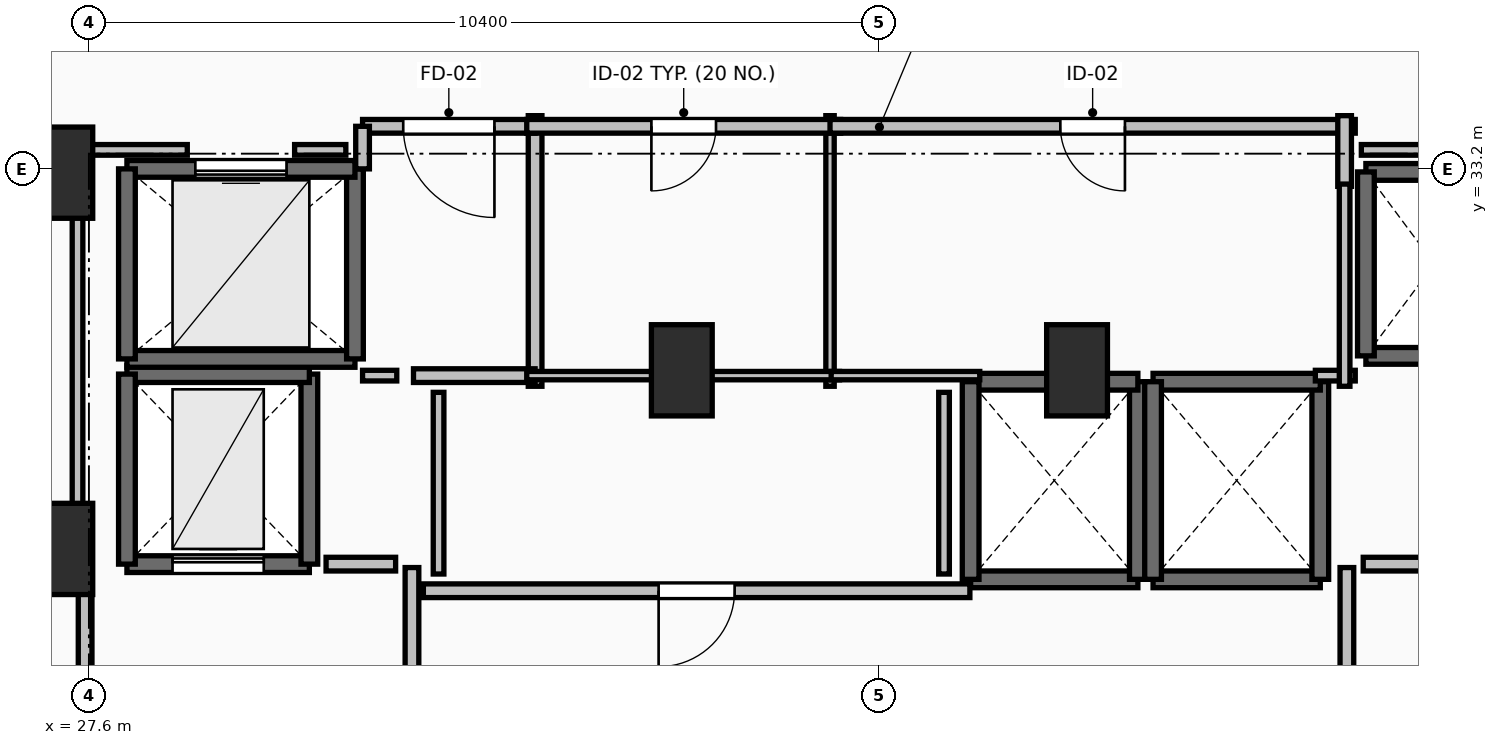
"""IFC4 building model, lengths in metres.
Left out: names, types, materials, properties, quantities, classifications, styles, units other than length and angle.
Written with IfcOpenShell. Run it as: python <this file> out.ifc"""

import sys

from ifc_helpers import new_model, si_unit, direction, frame, frame_2d, origin, origin_2d, place, context, subcontext, project, spatial, rectangle, extrude, element, fill, save


model = new_model("IFC4")
c1 = context("Model", 3, precision=1e-05, world=origin(), true_north=direction((0.0, 1.0)))
c2 = subcontext(c1, "Body", "Model", "MODEL_VIEW")
j1 = project(units=[si_unit("LENGTHUNIT", "METRE"), si_unit("PLANEANGLEUNIT", "RADIAN")], contexts=[c1])
p1 = place(None, origin())
s1 = spatial("IfcSite", under=j1, at=p1, CompositionType="ELEMENT")
p2 = place(p1, origin())
s2 = spatial("IfcBuilding", under=s1, at=p2, CompositionType="ELEMENT")
p3 = place(p2, frame((0.0, 0.0, 153.6)))
s3 = spatial("IfcBuildingStorey", under=s2, at=p3, CompositionType="ELEMENT", Elevation=153.6)
for number, where, z_axis, x_axis in (
    (1, (27.25, 28.2, 0.0), (0.0, 0.0, 1.0), (1.0, 0.0, 0.0)),
    (2, (27.25, 33.15, 0.0), (0.0, 0.0, 1.0), (1.0, 0.0, 0.0)),
    (3, (35.4, 30.55, 0.0), (0.0, 0.0, 1.0), (1.0, 0.0, 0.0)),
    (4, (40.6, 30.55, 0.0), (0.0, 0.0, 1.0), (1.0, 0.0, 0.0)),
):
    element("IfcColumn", number, at=place(p3, frame(where, z_axis=z_axis, x_axis=x_axis)), inside=s3, PredefinedType="PILASTER", context=c2, shape_type="SweptSolid", body=[
        extrude(rectangle(XDim=0.8, YDim=1.2, at=origin_2d()), origin(), (0.0, 0.0, 1.0), 3.5),
    ])
p4 = place(p3, frame((39.2, 27.8, 0.0), z_axis=(0.0, 0.0, 1.0), x_axis=(1.0, 0.0, 0.0)))
e5 = element("IfcWall", 5, at=p4, inside=s3, PredefinedType="SOLIDWALL", context=c2, shape_type="SweptSolid", body=[
    extrude(rectangle(XDim=2.2, YDim=0.22, at=frame_2d((1.1, 0.0))), origin(), (0.0, 0.0, 1.0), 3.24),
])
p5 = place(p3, frame((41.4, 27.8, 0.0), z_axis=(0.0, 0.0, 1.0), x_axis=(0.0, 1.0, 0.0)))
e6 = element("IfcWall", 6, at=p5, inside=s3, PredefinedType="SOLIDWALL", context=c2, shape_type="SweptSolid", body=[
    extrude(rectangle(XDim=2.6, YDim=0.22, at=frame_2d((1.3, 0.0))), origin(), (0.0, 0.0, 1.0), 3.24),
])
p6 = place(p3, frame((41.4, 30.4, 0.0), z_axis=(0.0, 0.0, 1.0), x_axis=(-1.0, 0.0, 0.0)))
e7 = element("IfcWall", 7, at=p6, inside=s3, PredefinedType="SOLIDWALL", context=c2, shape_type="SweptSolid", body=[
    extrude(rectangle(XDim=2.2, YDim=0.22, at=frame_2d((1.1, 0.0))), origin(), (0.0, 0.0, 1.0), 3.24),
])
p7 = place(p3, frame((39.2, 30.4, 0.0), z_axis=(0.0, 0.0, 1.0), x_axis=(0.0, -1.0, 0.0)))
e8 = element("IfcWall", 8, at=p7, inside=s3, PredefinedType="SOLIDWALL", context=c2, shape_type="SweptSolid", body=[
    extrude(rectangle(XDim=2.6, YDim=0.22, at=frame_2d((1.3, 0.0))), origin(), (0.0, 0.0, 1.0), 3.24),
])
p8 = place(p3, frame((41.6, 27.8, 0.0), z_axis=(0.0, 0.0, 1.0), x_axis=(1.0, 0.0, 0.0)))
e9 = element("IfcWall", 9, at=p8, inside=s3, PredefinedType="SOLIDWALL", context=c2, shape_type="SweptSolid", body=[
    extrude(rectangle(XDim=2.2, YDim=0.22, at=frame_2d((1.1, 0.0))), origin(), (0.0, 0.0, 1.0), 3.24),
])
p9 = place(p3, frame((43.8, 27.8, 0.0), z_axis=(0.0, 0.0, 1.0), x_axis=(0.0, 1.0, 0.0)))
e10 = element("IfcWall", 10, at=p9, inside=s3, PredefinedType="SOLIDWALL", context=c2, shape_type="SweptSolid", body=[
    extrude(rectangle(XDim=2.6, YDim=0.22, at=frame_2d((1.3, 0.0))), origin(), (0.0, 0.0, 1.0), 3.24),
])
p10 = place(p3, frame((43.8, 30.4, 0.0), z_axis=(0.0, 0.0, 1.0), x_axis=(-1.0, 0.0, 0.0)))
e11 = element("IfcWall", 11, at=p10, inside=s3, PredefinedType="SOLIDWALL", context=c2, shape_type="SweptSolid", body=[
    extrude(rectangle(XDim=2.2, YDim=0.22, at=frame_2d((1.1, 0.0))), origin(), (0.0, 0.0, 1.0), 3.24),
])
p11 = place(p3, frame((41.6, 30.4, 0.0), z_axis=(0.0, 0.0, 1.0), x_axis=(0.0, -1.0, 0.0)))
e12 = element("IfcWall", 12, at=p11, inside=s3, PredefinedType="SOLIDWALL", context=c2, shape_type="SweptSolid", body=[
    extrude(rectangle(XDim=2.6, YDim=0.22, at=frame_2d((1.3, 0.0))), origin(), (0.0, 0.0, 1.0), 3.24),
])
for number, where, z_axis, x_axis in (
    (13, (44.4, 30.74, 0.0), (0.0, 0.0, 1.0), (1.0, 0.0, 0.0)),
    (14, (46.2, 33.16, 0.0), (0.0, 0.0, 1.0), (-1.0, 0.0, 0.0)),
):
    element("IfcWall", number, at=place(p3, frame(where, z_axis=z_axis, x_axis=x_axis)), inside=s3, PredefinedType="SOLIDWALL", context=c2, shape_type="SweptSolid", body=[
        extrude(rectangle(XDim=1.8, YDim=0.22, at=frame_2d((0.9, 0.0))), origin(), (0.0, 0.0, 1.0), 3.24),
    ])
p12 = place(p3, frame((44.4, 33.16, 0.0), z_axis=(0.0, 0.0, 1.0), x_axis=(0.0, -1.0, 0.0)))
e15 = element("IfcWall", 15, at=p12, inside=s3, PredefinedType="SOLIDWALL", context=c2, shape_type="SweptSolid", body=[
    extrude(rectangle(XDim=2.42, YDim=0.22, at=frame_2d((1.21, 0.0))), origin(), (0.0, 0.0, 1.0), 3.24),
])
p13 = place(p3, frame((28.1, 28.0, 0.0), z_axis=(0.0, 0.0, 1.0), x_axis=(1.0, 0.0, 0.0)))
e16 = element("IfcWall", 16, at=p13, inside=s3, PredefinedType="SHEAR", context=c2, shape_type="SweptSolid", body=[
    extrude(rectangle(XDim=2.4, YDim=0.22, at=frame_2d((1.2, 0.0))), origin(), (0.0, 0.0, 1.0), 3.24),
])
p14 = place(p13, frame((0.6, 0.0, 0.0)))
e17 = element("IfcOpeningElement", 17, at=p14, cuts=e16, PredefinedType="OPENING", context=c2, shape_type="SweptSolid", body=[
    extrude(rectangle(XDim=1.2, YDim=2.2, at=frame_2d((0.6, 1.1))), frame((0.0, 0.125, 0.0), z_axis=(0.0, -1.0, 0.0), x_axis=(1.0, 0.0, 0.0)), (0.0, 0.0, 1.0), 0.25),
])
p15 = place(p3, frame((30.5, 28.0, 0.0), z_axis=(0.0, 0.0, 1.0), x_axis=(0.0, 1.0, 0.0)))
e18 = element("IfcWall", 18, at=p15, inside=s3, PredefinedType="SHEAR", context=c2, shape_type="SweptSolid", body=[
    extrude(rectangle(XDim=2.5, YDim=0.22, at=frame_2d((1.25, 0.0))), origin(), (0.0, 0.0, 1.0), 3.24),
])
p16 = place(p3, frame((30.5, 30.5, 0.0), z_axis=(0.0, 0.0, 1.0), x_axis=(-1.0, 0.0, 0.0)))
e19 = element("IfcWall", 19, at=p16, inside=s3, PredefinedType="SHEAR", context=c2, shape_type="SweptSolid", body=[
    extrude(rectangle(XDim=2.4, YDim=0.22, at=frame_2d((1.2, 0.0))), origin(), (0.0, 0.0, 1.0), 3.24),
])
p17 = place(p3, frame((28.1, 30.5, 0.0), z_axis=(0.0, 0.0, 1.0), x_axis=(0.0, -1.0, 0.0)))
e20 = element("IfcWall", 20, at=p17, inside=s3, PredefinedType="SHEAR", context=c2, shape_type="SweptSolid", body=[
    extrude(rectangle(XDim=2.5, YDim=0.22, at=frame_2d((1.25, 0.0))), origin(), (0.0, 0.0, 1.0), 3.24),
])
p18 = place(p3, frame((28.1, 30.7, 0.0), z_axis=(0.0, 0.0, 1.0), x_axis=(1.0, 0.0, 0.0)))
e21 = element("IfcWall", 21, at=p18, inside=s3, PredefinedType="SOLIDWALL", context=c2, shape_type="SweptSolid", body=[
    extrude(rectangle(XDim=3.0, YDim=0.22, at=frame_2d((1.5, 0.0))), origin(), (0.0, 0.0, 1.0), 3.24),
])
p19 = place(p3, frame((31.1, 30.7, 0.0), z_axis=(0.0, 0.0, 1.0), x_axis=(0.0, 1.0, 0.0)))
e22 = element("IfcWall", 22, at=p19, inside=s3, PredefinedType="SOLIDWALL", context=c2, shape_type="SweptSolid", body=[
    extrude(rectangle(XDim=2.5, YDim=0.22, at=frame_2d((1.25, 0.0))), origin(), (0.0, 0.0, 1.0), 3.24),
])
p20 = place(p3, frame((31.1, 33.2, 0.0), z_axis=(0.0, 0.0, 1.0), x_axis=(-1.0, 0.0, 0.0)))
e23 = element("IfcWall", 23, at=p20, inside=s3, PredefinedType="SOLIDWALL", context=c2, shape_type="SweptSolid", body=[
    extrude(rectangle(XDim=3.0, YDim=0.22, at=frame_2d((1.5, 0.0))), origin(), (0.0, 0.0, 1.0), 3.24),
])
p21 = place(p20, frame((0.9, 0.0, 0.0)))
e24 = element("IfcOpeningElement", 24, at=p21, cuts=e23, PredefinedType="OPENING", context=c2, shape_type="SweptSolid", body=[
    extrude(rectangle(XDim=1.2, YDim=2.2, at=frame_2d((0.6, 1.1))), frame((0.0, 0.125, 0.0), z_axis=(0.0, -1.0, 0.0), x_axis=(1.0, 0.0, 0.0)), (0.0, 0.0, 1.0), 0.25),
])
p22 = place(p3, frame((28.1, 33.2, 0.0), z_axis=(0.0, 0.0, 1.0), x_axis=(0.0, -1.0, 0.0)))
e25 = element("IfcWall", 25, at=p22, inside=s3, PredefinedType="SOLIDWALL", context=c2, shape_type="SweptSolid", body=[
    extrude(rectangle(XDim=2.5, YDim=0.22, at=frame_2d((1.25, 0.0))), origin(), (0.0, 0.0, 1.0), 3.24),
])
p23 = place(p3, frame((31.85, 24.045, 0.0), z_axis=(0.0, 0.0, 1.0), x_axis=(0.0, 1.0, 0.0)))
e26 = element("IfcWall", 26, at=p23, inside=s3, PredefinedType="PARTITIONING", context=c2, shape_type="SweptSolid", body=[
    extrude(rectangle(XDim=3.91, YDim=0.18, at=frame_2d((1.955, 0.0))), origin(), (0.0, 0.0, 1.0), 3.24),
])
p24 = place(p23, frame((1.355, 0.0, 0.0)))
e27 = element("IfcOpeningElement", 27, at=p24, cuts=e26, PredefinedType="OPENING", context=c2, shape_type="SweptSolid", body=[
    extrude(rectangle(XDim=1.2, YDim=2.15, at=frame_2d((0.6, 1.075))), frame((0.0, 0.105, 0.0), z_axis=(0.0, -1.0, 0.0), x_axis=(1.0, 0.0, 0.0)), (0.0, 0.0, 1.0), 0.21),
])
p25 = place(p3, frame((27.55, 28.0, 0.0), z_axis=(0.0, 0.0, 1.0), x_axis=(0.0, -1.0, 0.0)))
e28 = element("IfcWall", 28, at=p25, inside=s3, PredefinedType="PARTITIONING", context=c2, shape_type="SweptSolid", body=[
    extrude(rectangle(XDim=4.05, YDim=0.18, at=frame_2d((2.025, 0.0))), origin(), (0.0, 0.0, 1.0), 3.24),
])
p26 = place(p25, frame((1.425, 0.0, 0.0)))
e29 = element("IfcOpeningElement", 29, at=p26, cuts=e28, PredefinedType="OPENING", context=c2, shape_type="SweptSolid", body=[
    extrude(rectangle(XDim=1.2, YDim=2.15, at=frame_2d((0.6, 1.075))), frame((0.0, 0.105, 0.0), z_axis=(0.0, -1.0, 0.0), x_axis=(1.0, 0.0, 0.0)), (0.0, 0.0, 1.0), 0.21),
])
p27 = place(p3, frame((44.15, 27.955, 0.0), z_axis=(0.0, 0.0, 1.0), x_axis=(0.0, -1.0, 0.0)))
e30 = element("IfcWall", 30, at=p27, inside=s3, PredefinedType="PARTITIONING", context=c2, shape_type="SweptSolid", body=[
    extrude(rectangle(XDim=3.91, YDim=0.18, at=frame_2d((1.955, 0.0))), origin(), (0.0, 0.0, 1.0), 3.24),
])
p28 = place(p27, frame((1.355, 0.0, 0.0)))
e31 = element("IfcOpeningElement", 31, at=p28, cuts=e30, PredefinedType="OPENING", context=c2, shape_type="SweptSolid", body=[
    extrude(rectangle(XDim=1.2, YDim=2.15, at=frame_2d((0.6, 1.075))), frame((0.0, 0.105, 0.0), z_axis=(0.0, -1.0, 0.0), x_axis=(1.0, 0.0, 0.0)), (0.0, 0.0, 1.0), 0.21),
])
p29 = place(p3, frame((33.47, 30.34, 0.0), z_axis=(0.0, 0.0, 1.0), x_axis=(0.0, 1.0, 0.0)))
e32 = element("IfcWall", 32, at=p29, inside=s3, PredefinedType="PARTITIONING", context=c2, shape_type="SweptSolid", body=[
    extrude(rectangle(XDim=3.56, YDim=0.18, at=frame_2d((1.78, 0.0))), origin(), (0.0, 0.0, 1.0), 3.24),
])
p30 = place(p3, frame((31.87, 30.48, 0.0), z_axis=(0.0, 0.0, 1.0), x_axis=(1.0, 0.0, 0.0)))
e33 = element("IfcWall", 33, at=p30, inside=s3, PredefinedType="PARTITIONING", context=c2, shape_type="SweptSolid", body=[
    extrude(rectangle(XDim=1.6, YDim=0.18, at=frame_2d((0.8, 0.0))), origin(), (0.0, 0.0, 1.0), 3.24),
])
p31 = place(p3, frame((33.47, 33.76, 0.0), z_axis=(0.0, 0.0, 1.0), x_axis=(-1.0, 0.0, 0.0)))
e34 = element("IfcWall", 34, at=p31, inside=s3, PredefinedType="PARTITIONING", context=c2, shape_type="SweptSolid", body=[
    extrude(rectangle(XDim=2.27, YDim=0.18, at=frame_2d((1.135, 0.0))), origin(), (0.0, 0.0, 1.0), 3.24),
])
p32 = place(p31, frame((0.535, 0.0, 0.0)))
e35 = element("IfcOpeningElement", 35, at=p32, cuts=e34, PredefinedType="OPENING", context=c2, shape_type="SweptSolid", body=[
    extrude(rectangle(XDim=1.2, YDim=2.15, at=frame_2d((0.6, 1.075))), frame((0.0, 0.105, 0.0), z_axis=(0.0, -1.0, 0.0), x_axis=(1.0, 0.0, 0.0)), (0.0, 0.0, 1.0), 0.21),
])
p33 = place(p3, frame((31.2, 33.76, 0.0), z_axis=(0.0, 0.0, 1.0), x_axis=(0.0, -1.0, 0.0)))
e36 = element("IfcWall", 36, at=p33, inside=s3, PredefinedType="PARTITIONING", context=c2, shape_type="SweptSolid", body=[
    extrude(rectangle(XDim=0.56, YDim=0.18, at=frame_2d((0.28, 0.0))), origin(), (0.0, 0.0, 1.0), 3.24),
])
p34 = place(p3, frame((39.19, 27.65, 0.0), z_axis=(0.0, 0.0, 1.0), x_axis=(-1.0, 0.0, 0.0)))
e37 = element("IfcWall", 37, at=p34, inside=s3, PredefinedType="PARTITIONING", context=c2, shape_type="SweptSolid", body=[
    extrude(rectangle(XDim=7.19, YDim=0.18, at=frame_2d((3.595, 0.0))), origin(), (0.0, 0.0, 1.0), 3.24),
])
p35 = place(p34, frame((3.095, 0.0, 0.0)))
e38 = element("IfcOpeningElement", 38, at=p35, cuts=e37, PredefinedType="OPENING", context=c2, shape_type="SweptSolid", body=[
    extrude(rectangle(XDim=1.0, YDim=2.15, at=frame_2d((0.5, 1.075))), frame((0.0, 0.105, 0.0), z_axis=(0.0, -1.0, 0.0), x_axis=(1.0, 0.0, 0.0)), (0.0, 0.0, 1.0), 0.21),
])
p36 = place(p3, frame((37.35, 30.34, 0.0), z_axis=(0.0, 0.0, 1.0), x_axis=(0.0, 1.0, 0.0)))
e39 = element("IfcWall", 39, at=p36, inside=s3, PredefinedType="PARTITIONING", context=c2, shape_type="SweptSolid", body=[
    extrude(rectangle(XDim=3.56, YDim=0.11, at=frame_2d((1.78, 0.0))), origin(), (0.0, 0.0, 1.0), 2.432),
])
p37 = place(p3, frame((33.36, 30.48, 0.0), z_axis=(0.0, 0.0, 1.0), x_axis=(1.0, 0.0, 0.0)))
e40 = element("IfcWall", 40, at=p37, inside=s3, PredefinedType="PARTITIONING", context=c2, shape_type="SweptSolid", body=[
    extrude(rectangle(XDim=4.115, YDim=0.11, at=frame_2d((2.058, 0.0))), origin(), (0.0, 0.0, 1.0), 2.432),
])
p38 = place(p3, frame((37.49, 33.76, 0.0), z_axis=(0.0, 0.0, 1.0), x_axis=(-1.0, 0.0, 0.0)))
e41 = element("IfcWall", 41, at=p38, inside=s3, PredefinedType="PARTITIONING", context=c2, shape_type="SweptSolid", body=[
    extrude(rectangle(XDim=4.13, YDim=0.18, at=frame_2d((2.065, 0.0))), origin(), (0.0, 0.0, 1.0), 3.24),
])
p39 = place(p38, frame((1.64, 0.0, 0.0)))
e42 = element("IfcOpeningElement", 42, at=p39, cuts=e41, PredefinedType="OPENING", context=c2, shape_type="SweptSolid", body=[
    extrude(rectangle(XDim=0.85, YDim=2.1, at=frame_2d((0.425, 1.05))), frame((0.0, 0.105, 0.0), z_axis=(0.0, -1.0, 0.0), x_axis=(1.0, 0.0, 0.0)), (0.0, 0.0, 1.0), 0.21),
])
p40 = place(p3, frame((37.365, 30.48, 0.0), z_axis=(0.0, 0.0, 1.0), x_axis=(1.0, 0.0, 0.0)))
e43 = element("IfcWall", 43, at=p40, inside=s3, PredefinedType="PARTITIONING", context=c2, shape_type="SweptSolid", body=[
    extrude(rectangle(XDim=1.955, YDim=0.11, at=frame_2d((0.978, 0.0))), origin(), (0.0, 0.0, 1.0), 2.432),
])
p41 = place(p3, frame((44.26, 33.76, 0.0), z_axis=(0.0, 0.0, 1.0), x_axis=(-1.0, 0.0, 0.0)))
e44 = element("IfcWall", 44, at=p41, inside=s3, PredefinedType="PARTITIONING", context=c2, shape_type="SweptSolid", body=[
    extrude(rectangle(XDim=6.91, YDim=0.18, at=frame_2d((3.455, 0.0))), origin(), (0.0, 0.0, 1.0), 3.24),
])
p42 = place(p41, frame((3.03, 0.0, 0.0)))
e45 = element("IfcOpeningElement", 45, at=p42, cuts=e44, PredefinedType="OPENING", context=c2, shape_type="SweptSolid", body=[
    extrude(rectangle(XDim=0.85, YDim=2.1, at=frame_2d((0.425, 1.05))), frame((0.0, 0.105, 0.0), z_axis=(0.0, -1.0, 0.0), x_axis=(1.0, 0.0, 0.0)), (0.0, 0.0, 1.0), 0.21),
])
p43 = place(p3, frame((44.12, 32.97, 0.0), z_axis=(0.0, 0.0, 1.0), x_axis=(0.0, 1.0, 0.0)))
e46 = element("IfcWall", 46, at=p43, inside=s3, PredefinedType="PARTITIONING", context=c2, shape_type="SweptSolid", body=[
    extrude(rectangle(XDim=0.93, YDim=0.18, at=frame_2d((0.465, 0.0))), origin(), (0.0, 0.0, 1.0), 3.24),
])
for number, where, z_axis, x_axis in (
    (47, (31.635, 28.0, 0.0), (0.0, 0.0, 1.0), (-1.0, 0.0, 0.0)),
    (48, (45.28, 28.0, 0.0), (0.0, 0.0, 1.0), (-1.0, 0.0, 0.0)),
):
    element("IfcWall", number, at=place(p3, frame(where, z_axis=z_axis, x_axis=x_axis)), inside=s3, PredefinedType="PARTITIONING", context=c2, shape_type="SweptSolid", body=[
        extrude(rectangle(XDim=0.915, YDim=0.18, at=frame_2d((0.458, 0.0))), origin(), (0.0, 0.0, 1.0), 3.24),
    ])
p44 = place(p3, frame((31.2, 30.48, 0.0), z_axis=(0.0, 0.0, 1.0), x_axis=(1.0, 0.0, 0.0)))
e49 = element("IfcWall", 49, at=p44, inside=s3, PredefinedType="PARTITIONING", context=c2, shape_type="SweptSolid", body=[
    extrude(rectangle(XDim=0.45, YDim=0.14, at=frame_2d((0.225, 0.0))), origin(), (0.0, 0.0, 1.0), 3.24),
])
p45 = place(p3, frame((43.735, 30.48, 0.0), z_axis=(0.0, 0.0, 1.0), x_axis=(1.0, 0.0, 0.0)))
e50 = element("IfcWall", 50, at=p45, inside=s3, PredefinedType="PARTITIONING", context=c2, shape_type="SweptSolid", body=[
    extrude(rectangle(XDim=0.525, YDim=0.14, at=frame_2d((0.262, 0.0))), origin(), (0.0, 0.0, 1.0), 3.24),
])
p46 = place(p3, frame((44.12, 30.34, 0.0), z_axis=(0.0, 0.0, 1.0), x_axis=(0.0, 1.0, 0.0)))
e51 = element("IfcWall", 51, at=p46, inside=s3, PredefinedType="PARTITIONING", context=c2, shape_type="SweptSolid", body=[
    extrude(rectangle(XDim=2.66, YDim=0.14, at=frame_2d((1.33, 0.0))), origin(), (0.0, 0.0, 1.0), 3.24),
])
for number, where, z_axis, x_axis in (
    (52, (32.2, 30.26, 0.0), (0.0, 0.0, 1.0), (0.0, -1.0, 0.0)),
    (53, (38.85, 27.87, 0.0), (0.0, 0.0, 1.0), (0.0, 1.0, 0.0)),
):
    element("IfcWall", number, at=place(p3, frame(where, z_axis=z_axis, x_axis=x_axis)), inside=s3, PredefinedType="PARTITIONING", context=c2, shape_type="SweptSolid", body=[
        extrude(rectangle(XDim=2.39, YDim=0.14, at=frame_2d((1.195, 0.0))), origin(), (0.0, 0.0, 1.0), 3.24),
    ])
p47 = place(p3, frame((48.55, 33.45, 0.0), z_axis=(0.0, 0.0, 1.0), x_axis=(-1.0, 0.0, 0.0)))
e54 = element("IfcWall", 54, at=p47, inside=s3, PredefinedType="PARTITIONING", context=c2, shape_type="SweptSolid", body=[
    extrude(rectangle(XDim=4.21, YDim=0.14, at=frame_2d((2.105, 0.0))), origin(), (0.0, 0.0, 1.0), 2.432),
])
p48 = place(p3, frame((30.98, 33.45, 0.0), z_axis=(0.0, 0.0, 1.0), x_axis=(-1.0, 0.0, 0.0)))
e55 = element("IfcWall", 55, at=p48, inside=s3, PredefinedType="PARTITIONING", context=c2, shape_type="SweptSolid", body=[
    extrude(rectangle(XDim=0.674, YDim=0.14, at=frame_2d((0.337, 0.0))), origin(), (0.0, 0.0, 1.0), 3.24),
])
p49 = place(p3, frame((28.894, 33.45, 0.0), z_axis=(0.0, 0.0, 1.0), x_axis=(-1.0, 0.0, 0.0)))
e56 = element("IfcWall", 56, at=p49, inside=s3, PredefinedType="PARTITIONING", context=c2, shape_type="SweptSolid", body=[
    extrude(rectangle(XDim=1.444, YDim=0.14, at=frame_2d((0.722, 0.0))), origin(), (0.0, 0.0, 1.0), 2.432),
])
p50 = place(p3, frame((27.45, 33.45, 0.0), z_axis=(0.0, 0.0, 1.0), x_axis=(0.0, -1.0, 0.0)))
e57 = element("IfcWall", 57, at=p50, inside=s3, PredefinedType="PARTITIONING", context=c2, shape_type="SweptSolid", body=[
    extrude(rectangle(XDim=5.254, YDim=0.14, at=frame_2d((2.627, 0.0))), origin(), (0.0, 0.0, 1.0), 2.432),
])
p51 = place(p14, origin())
e58 = element("IfcDoor", 58, at=p51, inside=s3, OperationType="SLIDING_TO_LEFT", PredefinedType="DOOR", context=c2, shape_type="SweptSolid", body=[
    extrude(rectangle(XDim=1.2, YDim=2.2, at=frame_2d((0.6, 1.1))), frame((0.0, 0.025, 0.0), z_axis=(0.0, -1.0, 0.0), x_axis=(1.0, 0.0, 0.0)), (0.0, 0.0, 1.0), 0.05),
])
fill(e17, e58)
p52 = place(p21, origin())
e59 = element("IfcDoor", 59, at=p52, inside=s3, OperationType="SLIDING_TO_LEFT", PredefinedType="DOOR", context=c2, shape_type="SweptSolid", body=[
    extrude(rectangle(XDim=1.2, YDim=2.2, at=frame_2d((0.6, 1.1))), frame((0.0, 0.025, 0.0), z_axis=(0.0, -1.0, 0.0), x_axis=(1.0, 0.0, 0.0)), (0.0, 0.0, 1.0), 0.05),
])
fill(e24, e59)
p53 = place(p32, origin())
e60 = element("IfcDoor", 60, at=p53, inside=s3, OperationType="SINGLE_SWING_LEFT", PredefinedType="DOOR", context=c2, shape_type="SweptSolid", body=[
    extrude(rectangle(XDim=1.2, YDim=2.15, at=frame_2d((0.6, 1.075))), frame((0.0, 0.025, 0.0), z_axis=(0.0, -1.0, 0.0), x_axis=(1.0, 0.0, 0.0)), (0.0, 0.0, 1.0), 0.05),
])
fill(e35, e60)
p54 = place(p35, origin())
e61 = element("IfcDoor", 61, at=p54, inside=s3, OperationType="SINGLE_SWING_RIGHT", PredefinedType="DOOR", context=c2, shape_type="SweptSolid", body=[
    extrude(rectangle(XDim=1.0, YDim=2.15, at=frame_2d((0.5, 1.075))), frame((0.0, 0.025, 0.0), z_axis=(0.0, -1.0, 0.0), x_axis=(1.0, 0.0, 0.0)), (0.0, 0.0, 1.0), 0.05),
])
fill(e38, e61)
p55 = place(p39, origin())
e62 = element("IfcDoor", 62, at=p55, inside=s3, OperationType="SINGLE_SWING_RIGHT", PredefinedType="DOOR", context=c2, shape_type="SweptSolid", body=[
    extrude(rectangle(XDim=0.85, YDim=2.1, at=frame_2d((0.425, 1.05))), frame((0.0, 0.025, 0.0), z_axis=(0.0, -1.0, 0.0), x_axis=(1.0, 0.0, 0.0)), (0.0, 0.0, 1.0), 0.05),
])
fill(e42, e62)
p56 = place(p42, origin())
e63 = element("IfcDoor", 63, at=p56, inside=s3, OperationType="SINGLE_SWING_LEFT", PredefinedType="DOOR", context=c2, shape_type="SweptSolid", body=[
    extrude(rectangle(XDim=0.85, YDim=2.1, at=frame_2d((0.425, 1.05))), frame((0.0, 0.025, 0.0), z_axis=(0.0, -1.0, 0.0), x_axis=(1.0, 0.0, 0.0)), (0.0, 0.0, 1.0), 0.05),
])
fill(e45, e63)
save(model, sys.argv[1])
